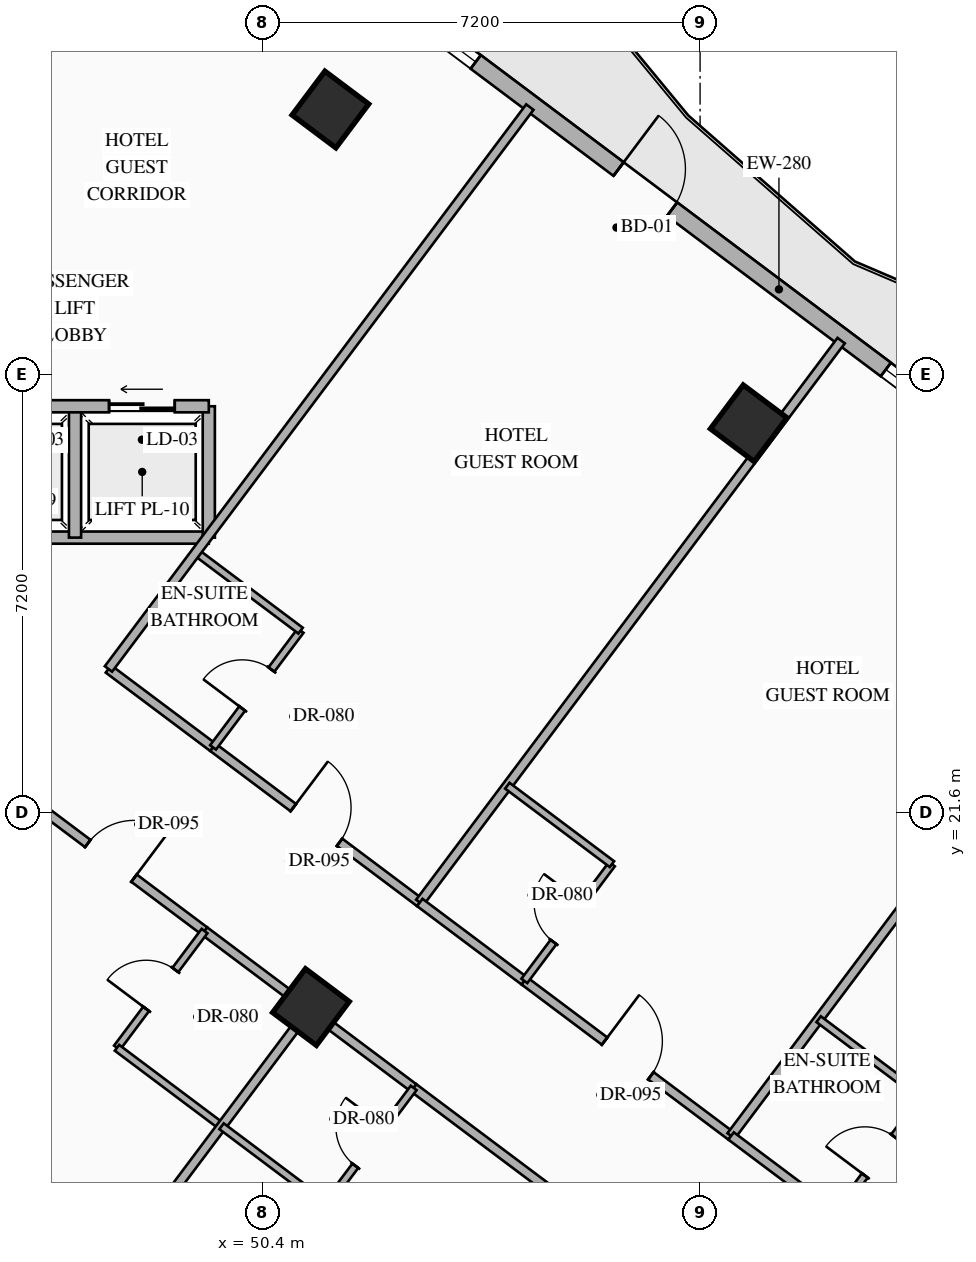
"""IFC4 building model, lengths in metres.
Left out: names, types, materials, properties, quantities, classifications, styles, units other than length and angle.
Written with IfcOpenShell. Run it as: python <this file> out.ifc"""

import sys

from ifc_helpers import new_model, si_unit, direction, frame, frame_2d, origin, origin_2d, place, context, subcontext, project, spatial, rectangle, hollow_rectangle, extrude, element, fill, save


model = new_model("IFC4")
c1 = context("Model", 3, precision=1e-05, world=origin(), true_north=direction((0.0, 1.0)))
c2 = subcontext(c1, "Body", "Model", "MODEL_VIEW")
j1 = project(units=[si_unit("LENGTHUNIT", "METRE"), si_unit("PLANEANGLEUNIT", "RADIAN")], contexts=[c1])
p1 = place(None, origin())
s1 = spatial("IfcSite", under=j1, at=p1, CompositionType="ELEMENT")
p2 = place(p1, origin())
s2 = spatial("IfcBuilding", under=s1, at=p2, CompositionType="ELEMENT")
p3 = place(p2, frame((0.0, 0.0, 70.1)))
s3 = spatial("IfcBuildingStorey", under=s2, at=p3, CompositionType="ELEMENT", Elevation=70.1)
for number, where, z_axis, x_axis in (
    (1, (51.52, 33.16, 0.0), (0.0, 0.0, 1.0), (0.8, -0.6, 0.0)),
    (2, (58.4, 28.0, 0.0), (0.0, 0.0, 1.0), (0.8, -0.6, 0.0)),
    (3, (51.2, 18.4, 0.0), (0.0, 0.0, 1.0), (0.8, -0.6, 0.0)),
):
    element("IfcColumn", number, at=place(p3, frame(where, z_axis=z_axis, x_axis=x_axis)), inside=s3, PredefinedType="COLUMN", context=c2, shape_type="SweptSolid", body=[
        extrude(hollow_rectangle(XDim=0.9, YDim=0.9, WallThickness=0.036, at=origin_2d()), origin(), (0.0, 0.0, 1.0), 4.5),
    ])
p4 = place(p3, frame((44.86, 40.73, 0.0), z_axis=(0.0, 0.0, 1.0), x_axis=(0.800006902154, -0.599990797017, 0.0)))
e4 = element("IfcWall", 4, at=p4, inside=s3, PredefinedType="STANDARD", context=c2, shape_type="SweptSolid", body=[
    extrude(rectangle(XDim=29.712, YDim=0.28, at=frame_2d((14.856, 0.0))), origin(), (0.0, 0.0, 1.0), 4.28),
])
p5 = place(p4, frame((14.249, 0.0, 0.0)))
e5 = element("IfcOpeningElement", 5, at=p5, cuts=e4, PredefinedType="OPENING", context=c2, shape_type="SweptSolid", body=[
    extrude(rectangle(XDim=1.1, YDim=2.2, at=frame_2d((0.55, 1.1))), frame((0.0, 0.15, 0.0), z_axis=(0.0, -1.0, 0.0), x_axis=(1.0, 0.0, 0.0)), (0.0, 0.0, 1.0), 0.3),
])
p6 = place(p4, frame((1.612, 0.0, 0.85)))
e6 = element("IfcOpeningElement", 6, at=p6, cuts=e4, PredefinedType="OPENING", context=c2, shape_type="SweptSolid", body=[
    extrude(rectangle(XDim=1.4, YDim=1.8, at=frame_2d((0.7, 0.9))), frame((0.0, 0.15, 0.0), z_axis=(0.0, -1.0, 0.0), x_axis=(1.0, 0.0, 0.0)), (0.0, 0.0, 1.0), 0.3),
])
p7 = place(p4, frame((5.667, 0.0, 0.85)))
e7 = element("IfcOpeningElement", 7, at=p7, cuts=e4, PredefinedType="OPENING", context=c2, shape_type="SweptSolid", body=[
    extrude(rectangle(XDim=1.4, YDim=1.8, at=frame_2d((0.7, 0.9))), frame((0.0, 0.15, 0.0), z_axis=(0.0, -1.0, 0.0), x_axis=(1.0, 0.0, 0.0)), (0.0, 0.0, 1.0), 0.3),
])
p8 = place(p4, frame((9.912, 0.0, 0.85)))
e8 = element("IfcOpeningElement", 8, at=p8, cuts=e4, PredefinedType="OPENING", context=c2, shape_type="SweptSolid", body=[
    extrude(rectangle(XDim=1.4, YDim=1.8, at=frame_2d((0.7, 0.9))), frame((0.0, 0.15, 0.0), z_axis=(0.0, -1.0, 0.0), x_axis=(1.0, 0.0, 0.0)), (0.0, 0.0, 1.0), 0.3),
])
p9 = place(p4, frame((19.743, 0.0, 0.85)))
e9 = element("IfcOpeningElement", 9, at=p9, cuts=e4, PredefinedType="OPENING", context=c2, shape_type="SweptSolid", body=[
    extrude(rectangle(XDim=1.4, YDim=1.8, at=frame_2d((0.7, 0.9))), frame((0.0, 0.15, 0.0), z_axis=(0.0, -1.0, 0.0), x_axis=(1.0, 0.0, 0.0)), (0.0, 0.0, 1.0), 0.3),
])
p10 = place(p4, frame((22.645, 0.0, 0.85)))
e10 = element("IfcOpeningElement", 10, at=p10, cuts=e4, PredefinedType="OPENING", context=c2, shape_type="SweptSolid", body=[
    extrude(rectangle(XDim=1.4, YDim=1.8, at=frame_2d((0.7, 0.9))), frame((0.0, 0.15, 0.0), z_axis=(0.0, -1.0, 0.0), x_axis=(1.0, 0.0, 0.0)), (0.0, 0.0, 1.0), 0.3),
])
p11 = place(p4, frame((26.354, 0.0, 0.85)))
e11 = element("IfcOpeningElement", 11, at=p11, cuts=e4, PredefinedType="OPENING", context=c2, shape_type="SweptSolid", body=[
    extrude(rectangle(XDim=1.4, YDim=1.8, at=frame_2d((0.7, 0.9))), frame((0.0, 0.15, 0.0), z_axis=(0.0, -1.0, 0.0), x_axis=(1.0, 0.0, 0.0)), (0.0, 0.0, 1.0), 0.3),
])
p12 = place(p3, frame((45.12, 26.12, 0.0), z_axis=(0.0, 0.0, 1.0), x_axis=(1.0, 0.0, 0.0)))
e12 = element("IfcWall", 12, at=p12, inside=s3, PredefinedType="STANDARD", context=c2, shape_type="SweptSolid", body=[
    extrude(rectangle(XDim=4.4, YDim=0.2, at=frame_2d((2.2, 0.0))), origin(), (0.0, 0.0, 1.0), 4.28),
])
for number, where, z_axis, x_axis in (
    (13, (49.52, 26.12, 0.0), (0.0, 0.0, 1.0), (0.0, 1.0, 0.0)),
    (14, (47.32, 26.12, 0.0), (0.0, 0.0, 1.0), (0.0, 1.0, 0.0)),
):
    element("IfcWall", number, at=place(p3, frame(where, z_axis=z_axis, x_axis=x_axis)), inside=s3, PredefinedType="STANDARD", context=c2, shape_type="SweptSolid", body=[
        extrude(rectangle(XDim=2.16, YDim=0.2, at=frame_2d((1.08, 0.0))), origin(), (0.0, 0.0, 1.0), 4.28),
    ])
p13 = place(p3, frame((45.12, 28.28, 0.0), z_axis=(0.0, 0.0, 1.0), x_axis=(1.0, 0.0, 0.0)))
e15 = element("IfcWall", 15, at=p13, inside=s3, PredefinedType="STANDARD", context=c2, shape_type="SweptSolid", body=[
    extrude(rectangle(XDim=4.4, YDim=0.2, at=frame_2d((2.2, 0.0))), origin(), (0.0, 0.0, 1.0), 4.28),
])
p14 = place(p13, frame((0.56, 0.0, 0.0)))
e16 = element("IfcOpeningElement", 16, at=p14, cuts=e15, PredefinedType="OPENING", context=c2, shape_type="SweptSolid", body=[
    extrude(rectangle(XDim=1.08, YDim=2.15, at=frame_2d((0.54, 1.075))), frame((0.0, 0.11, 0.0), z_axis=(0.0, -1.0, 0.0), x_axis=(1.0, 0.0, 0.0)), (0.0, 0.0, 1.0), 0.22),
])
p15 = place(p13, frame((2.76, 0.0, 0.0)))
e17 = element("IfcOpeningElement", 17, at=p15, cuts=e15, PredefinedType="OPENING", context=c2, shape_type="SweptSolid", body=[
    extrude(rectangle(XDim=1.08, YDim=2.15, at=frame_2d((0.54, 1.075))), frame((0.0, 0.11, 0.0), z_axis=(0.0, -1.0, 0.0), x_axis=(1.0, 0.0, 0.0)), (0.0, 0.0, 1.0), 0.22),
])
p16 = place(p3, frame((47.87, 23.96, 0.0), z_axis=(0.0, 0.0, 1.0), x_axis=(0.79998637334, -0.60001816845, 0.0)))
e18 = element("IfcWall", 18, at=p16, inside=s3, PredefinedType="PARTITIONING", context=c2, shape_type="SweptSolid", body=[
    extrude(rectangle(XDim=2.15, YDim=0.15, at=frame_2d((1.075, 0.0))), origin(), (0.0, 0.0, 1.0), 3.925),
])
p17 = place(p3, frame((49.59, 22.67, 0.0), z_axis=(0.0, 0.0, 1.0), x_axis=(0.800013787187, -0.599981616644, 0.0)))
e19 = element("IfcWall", 19, at=p17, inside=s3, PredefinedType="PARTITIONING", context=c2, shape_type="SweptSolid", body=[
    extrude(rectangle(XDim=4.25, YDim=0.15, at=frame_2d((2.125, 0.0))), origin(), (0.0, 0.0, 1.0), 3.925),
])
p18 = place(p17, frame((1.65, 0.0, 0.0)))
e20 = element("IfcOpeningElement", 20, at=p18, cuts=e19, PredefinedType="OPENING", context=c2, shape_type="SweptSolid", body=[
    extrude(rectangle(XDim=0.95, YDim=2.15, at=frame_2d((0.475, 1.075))), frame((0.0, 0.085, 0.0), z_axis=(0.0, -1.0, 0.0), x_axis=(1.0, 0.0, 0.0)), (0.0, 0.0, 1.0), 0.17),
])
p19 = place(p3, frame((49.59, 22.67, 0.0), z_axis=(0.0, 0.0, 1.0), x_axis=(0.599951172744, 0.800036618114, 0.0)))
e21 = element("IfcWall", 21, at=p19, inside=s3, PredefinedType="PARTITIONING", context=c2, shape_type="SweptSolid", body=[
    extrude(rectangle(XDim=2.4, YDim=0.12, at=frame_2d((1.2, 0.0))), origin(), (0.0, 0.0, 1.0), 4.28),
])
p20 = place(p19, frame((0.8, 0.0, 0.0)))
e22 = element("IfcOpeningElement", 22, at=p20, cuts=e21, PredefinedType="OPENING", context=c2, shape_type="SweptSolid", body=[
    extrude(rectangle(XDim=0.8, YDim=2.06, at=frame_2d((0.4, 1.03))), frame((0.0, 0.07, 0.0), z_axis=(0.0, -1.0, 0.0), x_axis=(1.0, 0.0, 0.0)), (0.0, 0.0, 1.0), 0.14),
])
p21 = place(p3, frame((49.31, 25.88, 0.0), z_axis=(0.0, 0.0, 1.0), x_axis=(0.800040880289, -0.59994548908, 0.0)))
e23 = element("IfcWall", 23, at=p21, inside=s3, PredefinedType="PARTITIONING", context=c2, shape_type="SweptSolid", body=[
    extrude(rectangle(XDim=2.15, YDim=0.12, at=frame_2d((1.075, 0.0))), origin(), (0.0, 0.0, 1.0), 4.28),
])
for number, where, z_axis, x_axis in (
    (24, (47.87, 23.96, 0.0), (0.0, 0.0, 1.0), (0.6, 0.8, 0.0)),
    (25, (52.99, 20.12, 0.0), (0.0, 0.0, 1.0), (0.6, 0.8, 0.0)),
):
    element("IfcWall", number, at=place(p3, frame(where, z_axis=z_axis, x_axis=x_axis)), inside=s3, PredefinedType="PARTITIONING", context=c2, shape_type="SweptSolid", body=[
        extrude(rectangle(XDim=11.55, YDim=0.15, at=frame_2d((5.775, 0.0))), origin(), (0.0, 0.0, 1.0), 4.28),
    ])
p22 = place(p3, frame((52.99, 20.12, 0.0), z_axis=(0.0, 0.0, 1.0), x_axis=(0.79998637334, -0.60001816845, 0.0)))
e26 = element("IfcWall", 26, at=p22, inside=s3, PredefinedType="PARTITIONING", context=c2, shape_type="SweptSolid", body=[
    extrude(rectangle(XDim=2.15, YDim=0.15, at=frame_2d((1.075, 0.0))), origin(), (0.0, 0.0, 1.0), 3.925),
])
p23 = place(p3, frame((54.71, 18.83, 0.0), z_axis=(0.0, 0.0, 1.0), x_axis=(0.800006893092, -0.599990809101, 0.0)))
e27 = element("IfcWall", 27, at=p23, inside=s3, PredefinedType="PARTITIONING", context=c2, shape_type="SweptSolid", body=[
    extrude(rectangle(XDim=4.25, YDim=0.15, at=frame_2d((2.125, 0.0))), origin(), (0.0, 0.0, 1.0), 3.925),
])
p24 = place(p23, frame((1.65, 0.0, 0.0)))
e28 = element("IfcOpeningElement", 28, at=p24, cuts=e27, PredefinedType="OPENING", context=c2, shape_type="SweptSolid", body=[
    extrude(rectangle(XDim=0.95, YDim=2.15, at=frame_2d((0.475, 1.075))), frame((0.0, 0.085, 0.0), z_axis=(0.0, -1.0, 0.0), x_axis=(1.0, 0.0, 0.0)), (0.0, 0.0, 1.0), 0.17),
])
p25 = place(p3, frame((54.71, 18.83, 0.0), z_axis=(0.0, 0.0, 1.0), x_axis=(0.6, 0.8, 0.0)))
e29 = element("IfcWall", 29, at=p25, inside=s3, PredefinedType="PARTITIONING", context=c2, shape_type="SweptSolid", body=[
    extrude(rectangle(XDim=2.4, YDim=0.12, at=frame_2d((1.2, 0.0))), origin(), (0.0, 0.0, 1.0), 4.28),
])
p26 = place(p25, frame((0.8, 0.0, 0.0)))
e30 = element("IfcOpeningElement", 30, at=p26, cuts=e29, PredefinedType="OPENING", context=c2, shape_type="SweptSolid", body=[
    extrude(rectangle(XDim=0.8, YDim=2.06, at=frame_2d((0.4, 1.03))), frame((0.0, 0.07, 0.0), z_axis=(0.0, -1.0, 0.0), x_axis=(1.0, 0.0, 0.0)), (0.0, 0.0, 1.0), 0.14),
])
p27 = place(p3, frame((54.43, 22.04, 0.0), z_axis=(0.0, 0.0, 1.0), x_axis=(0.79998637334, -0.60001816845, 0.0)))
e31 = element("IfcWall", 31, at=p27, inside=s3, PredefinedType="PARTITIONING", context=c2, shape_type="SweptSolid", body=[
    extrude(rectangle(XDim=2.15, YDim=0.12, at=frame_2d((1.075, 0.0))), origin(), (0.0, 0.0, 1.0), 4.28),
])
p28 = place(p3, frame((58.11, 16.28, 0.0), z_axis=(0.0, 0.0, 1.0), x_axis=(0.599996617946, 0.80000253653, 0.0)))
e32 = element("IfcWall", 32, at=p28, inside=s3, PredefinedType="PARTITIONING", context=c2, shape_type="SweptSolid", body=[
    extrude(rectangle(XDim=11.55, YDim=0.15, at=frame_2d((5.775, 0.0))), origin(), (0.0, 0.0, 1.0), 4.28),
])
p29 = place(p3, frame((58.11, 16.28, 0.0), z_axis=(0.0, 0.0, 1.0), x_axis=(0.79998637334, -0.60001816845, 0.0)))
e33 = element("IfcWall", 33, at=p29, inside=s3, PredefinedType="PARTITIONING", context=c2, shape_type="SweptSolid", body=[
    extrude(rectangle(XDim=2.15, YDim=0.15, at=frame_2d((1.075, 0.0))), origin(), (0.0, 0.0, 1.0), 3.925),
])
p30 = place(p3, frame((59.83, 14.99, 0.0), z_axis=(0.0, 0.0, 1.0), x_axis=(0.6, 0.8, 0.0)))
e34 = element("IfcWall", 34, at=p30, inside=s3, PredefinedType="PARTITIONING", context=c2, shape_type="SweptSolid", body=[
    extrude(rectangle(XDim=2.4, YDim=0.12, at=frame_2d((1.2, 0.0))), origin(), (0.0, 0.0, 1.0), 4.28),
])
p31 = place(p30, frame((0.8, 0.0, 0.0)))
e35 = element("IfcOpeningElement", 35, at=p31, cuts=e34, PredefinedType="OPENING", context=c2, shape_type="SweptSolid", body=[
    extrude(rectangle(XDim=0.8, YDim=2.06, at=frame_2d((0.4, 1.03))), frame((0.0, 0.07, 0.0), z_axis=(0.0, -1.0, 0.0), x_axis=(1.0, 0.0, 0.0)), (0.0, 0.0, 1.0), 0.14),
])
p32 = place(p3, frame((59.55, 18.2, 0.0), z_axis=(0.0, 0.0, 1.0), x_axis=(0.79998637334, -0.60001816845, 0.0)))
e36 = element("IfcWall", 36, at=p32, inside=s3, PredefinedType="PARTITIONING", context=c2, shape_type="SweptSolid", body=[
    extrude(rectangle(XDim=2.15, YDim=0.12, at=frame_2d((1.075, 0.0))), origin(), (0.0, 0.0, 1.0), 4.28),
])
p33 = place(p3, frame((46.37, 21.96, 0.0), z_axis=(0.0, 0.0, 1.0), x_axis=(0.799977170108, -0.600030438649, 0.0)))
e37 = element("IfcWall", 37, at=p33, inside=s3, PredefinedType="PARTITIONING", context=c2, shape_type="SweptSolid", body=[
    extrude(rectangle(XDim=3.85, YDim=0.15, at=frame_2d((1.925, 0.0))), origin(), (0.0, 0.0, 1.0), 3.475),
])
p34 = place(p33, frame((1.45, 0.0, 0.0)))
e38 = element("IfcOpeningElement", 38, at=p34, cuts=e37, PredefinedType="OPENING", context=c2, shape_type="SweptSolid", body=[
    extrude(rectangle(XDim=0.95, YDim=2.15, at=frame_2d((0.475, 1.075))), frame((0.0, 0.085, 0.0), z_axis=(0.0, -1.0, 0.0), x_axis=(1.0, 0.0, 0.0)), (0.0, 0.0, 1.0), 0.17),
])
p35 = place(p3, frame((49.45, 19.65, 0.0), z_axis=(0.0, 0.0, 1.0), x_axis=(0.800040880289, -0.59994548908, 0.0)))
e39 = element("IfcWall", 39, at=p35, inside=s3, PredefinedType="PARTITIONING", context=c2, shape_type="SweptSolid", body=[
    extrude(rectangle(XDim=2.15, YDim=0.15, at=frame_2d((1.075, 0.0))), origin(), (0.0, 0.0, 1.0), 3.475),
])
p36 = place(p3, frame((48.01, 17.73, 0.0), z_axis=(0.0, 0.0, 1.0), x_axis=(0.6, 0.8, 0.0)))
e40 = element("IfcWall", 40, at=p36, inside=s3, PredefinedType="PARTITIONING", context=c2, shape_type="SweptSolid", body=[
    extrude(rectangle(XDim=2.4, YDim=0.12, at=frame_2d((1.2, 0.0))), origin(), (0.0, 0.0, 1.0), 4.28),
])
p37 = place(p36, frame((0.8, 0.0, 0.0)))
e41 = element("IfcOpeningElement", 41, at=p37, cuts=e40, PredefinedType="OPENING", context=c2, shape_type="SweptSolid", body=[
    extrude(rectangle(XDim=0.8, YDim=2.06, at=frame_2d((0.4, 1.03))), frame((0.0, 0.07, 0.0), z_axis=(0.0, -1.0, 0.0), x_axis=(1.0, 0.0, 0.0)), (0.0, 0.0, 1.0), 0.14),
])
p38 = place(p3, frame((48.01, 17.73, 0.0), z_axis=(0.0, 0.0, 1.0), x_axis=(0.79998637334, -0.60001816845, 0.0)))
e42 = element("IfcWall", 42, at=p38, inside=s3, PredefinedType="PARTITIONING", context=c2, shape_type="SweptSolid", body=[
    extrude(rectangle(XDim=2.15, YDim=0.12, at=frame_2d((1.075, 0.0))), origin(), (0.0, 0.0, 1.0), 4.28),
])
p39 = place(p3, frame((44.36, 9.28, 0.0), z_axis=(0.0, 0.0, 1.0), x_axis=(0.599986233332, 0.800010324816, 0.0)))
e43 = element("IfcWall", 43, at=p39, inside=s3, PredefinedType="PARTITIONING", context=c2, shape_type="SweptSolid", body=[
    extrude(rectangle(XDim=11.35, YDim=0.15, at=frame_2d((5.675, 0.0))), origin(), (0.0, 0.0, 1.0), 3.475),
])
p40 = place(p3, frame((51.17, 18.36, 0.0), z_axis=(0.0, 0.0, 1.0), x_axis=(0.79998637334, -0.60001816845, 0.0)))
e44 = element("IfcWall", 44, at=p40, inside=s3, PredefinedType="PARTITIONING", context=c2, shape_type="SweptSolid", body=[
    extrude(rectangle(XDim=2.15, YDim=0.15, at=frame_2d((1.075, 0.0))), origin(), (0.0, 0.0, 1.0), 3.475),
])
p41 = place(p3, frame((52.89, 17.07, 0.0), z_axis=(0.0, 0.0, 1.0), x_axis=(0.8, -0.6, 0.0)))
e45 = element("IfcWall", 45, at=p41, inside=s3, PredefinedType="PARTITIONING", context=c2, shape_type="SweptSolid", body=[
    extrude(rectangle(XDim=11.51, YDim=0.15, at=frame_2d((5.755, 0.0))), origin(), (0.0, 0.0, 1.0), 3.475),
])
p42 = place(p41, frame((5.28, 0.0, 0.0)))
e46 = element("IfcOpeningElement", 46, at=p42, cuts=e45, PredefinedType="OPENING", context=c2, shape_type="SweptSolid", body=[
    extrude(rectangle(XDim=0.95, YDim=2.15, at=frame_2d((0.475, 1.075))), frame((0.0, 0.085, 0.0), z_axis=(0.0, -1.0, 0.0), x_axis=(1.0, 0.0, 0.0)), (0.0, 0.0, 1.0), 0.17),
])
p43 = place(p3, frame((51.45, 15.15, 0.0), z_axis=(0.0, 0.0, 1.0), x_axis=(0.599951172744, 0.800036618114, 0.0)))
e47 = element("IfcWall", 47, at=p43, inside=s3, PredefinedType="PARTITIONING", context=c2, shape_type="SweptSolid", body=[
    extrude(rectangle(XDim=2.4, YDim=0.12, at=frame_2d((1.2, 0.0))), origin(), (0.0, 0.0, 1.0), 4.28),
])
p44 = place(p43, frame((0.8, 0.0, 0.0)))
e48 = element("IfcOpeningElement", 48, at=p44, cuts=e47, PredefinedType="OPENING", context=c2, shape_type="SweptSolid", body=[
    extrude(rectangle(XDim=0.8, YDim=2.06, at=frame_2d((0.4, 1.03))), frame((0.0, 0.07, 0.0), z_axis=(0.0, -1.0, 0.0), x_axis=(1.0, 0.0, 0.0)), (0.0, 0.0, 1.0), 0.14),
])
p45 = place(p3, frame((49.73, 16.44, 0.0), z_axis=(0.0, 0.0, 1.0), x_axis=(0.79998637334, -0.60001816845, 0.0)))
e49 = element("IfcWall", 49, at=p45, inside=s3, PredefinedType="PARTITIONING", context=c2, shape_type="SweptSolid", body=[
    extrude(rectangle(XDim=2.15, YDim=0.12, at=frame_2d((1.075, 0.0))), origin(), (0.0, 0.0, 1.0), 4.28),
])
p46 = place(p5, origin())
e50 = element("IfcDoor", 50, at=p46, inside=s3, OperationType="SINGLE_SWING_LEFT", PredefinedType="DOOR", context=c2, shape_type="SweptSolid", body=[
    extrude(rectangle(XDim=1.1, YDim=2.2, at=frame_2d((0.55, 1.1))), frame((0.0, 0.025, 0.0), z_axis=(0.0, -1.0, 0.0), x_axis=(1.0, 0.0, 0.0)), (0.0, 0.0, 1.0), 0.05),
])
fill(e5, e50)
p47 = place(p8, origin())
e51 = element("IfcWindow", 51, at=p47, inside=s3, PartitioningType="SINGLE_PANEL", PredefinedType="WINDOW", context=c2, shape_type="SweptSolid", body=[
    extrude(rectangle(XDim=1.4, YDim=1.8, at=frame_2d((0.7, 0.9))), frame((0.0, 0.03, 0.0), z_axis=(0.0, -1.0, 0.0), x_axis=(1.0, 0.0, 0.0)), (0.0, 0.0, 1.0), 0.06),
])
fill(e8, e51)
p48 = place(p9, origin())
e52 = element("IfcWindow", 52, at=p48, inside=s3, PartitioningType="SINGLE_PANEL", PredefinedType="WINDOW", context=c2, shape_type="SweptSolid", body=[
    extrude(rectangle(XDim=1.4, YDim=1.8, at=frame_2d((0.7, 0.9))), frame((0.0, 0.03, 0.0), z_axis=(0.0, -1.0, 0.0), x_axis=(1.0, 0.0, 0.0)), (0.0, 0.0, 1.0), 0.06),
])
fill(e9, e52)
p49 = place(p15, origin())
e53 = element("IfcDoor", 53, at=p49, inside=s3, OperationType="SLIDING_TO_LEFT", PredefinedType="USERDEFINED", context=c2, shape_type="SweptSolid", body=[
    extrude(rectangle(XDim=1.08, YDim=2.15, at=frame_2d((0.54, 1.075))), frame((0.0, 0.025, 0.0), z_axis=(0.0, -1.0, 0.0), x_axis=(1.0, 0.0, 0.0)), (0.0, 0.0, 1.0), 0.05),
])
fill(e17, e53)
p50 = place(p18, origin())
e54 = element("IfcDoor", 54, at=p50, inside=s3, OperationType="SINGLE_SWING_LEFT", PredefinedType="DOOR", context=c2, shape_type="SweptSolid", body=[
    extrude(rectangle(XDim=0.95, YDim=2.15, at=frame_2d((0.475, 1.075))), frame((0.0, 0.025, 0.0), z_axis=(0.0, -1.0, 0.0), x_axis=(1.0, 0.0, 0.0)), (0.0, 0.0, 1.0), 0.05),
])
fill(e20, e54)
p51 = place(p20, origin())
e55 = element("IfcDoor", 55, at=p51, inside=s3, OperationType="SINGLE_SWING_LEFT", PredefinedType="DOOR", context=c2, shape_type="SweptSolid", body=[
    extrude(rectangle(XDim=0.8, YDim=2.06, at=frame_2d((0.4, 1.03))), frame((0.0, 0.025, 0.0), z_axis=(0.0, -1.0, 0.0), x_axis=(1.0, 0.0, 0.0)), (0.0, 0.0, 1.0), 0.05),
])
fill(e22, e55)
p52 = place(p24, origin())
e56 = element("IfcDoor", 56, at=p52, inside=s3, OperationType="SINGLE_SWING_LEFT", PredefinedType="DOOR", context=c2, shape_type="SweptSolid", body=[
    extrude(rectangle(XDim=0.95, YDim=2.15, at=frame_2d((0.475, 1.075))), frame((0.0, 0.025, 0.0), z_axis=(0.0, -1.0, 0.0), x_axis=(1.0, 0.0, 0.0)), (0.0, 0.0, 1.0), 0.05),
])
fill(e28, e56)
p53 = place(p26, origin())
e57 = element("IfcDoor", 57, at=p53, inside=s3, OperationType="SINGLE_SWING_RIGHT", PredefinedType="DOOR", context=c2, shape_type="SweptSolid", body=[
    extrude(rectangle(XDim=0.8, YDim=2.06, at=frame_2d((0.4, 1.03))), frame((0.0, 0.025, 0.0), z_axis=(0.0, -1.0, 0.0), x_axis=(1.0, 0.0, 0.0)), (0.0, 0.0, 1.0), 0.05),
])
fill(e30, e57)
p54 = place(p31, origin())
e58 = element("IfcDoor", 58, at=p54, inside=s3, OperationType="SINGLE_SWING_LEFT", PredefinedType="DOOR", context=c2, shape_type="SweptSolid", body=[
    extrude(rectangle(XDim=0.8, YDim=2.06, at=frame_2d((0.4, 1.03))), frame((0.0, 0.025, 0.0), z_axis=(0.0, -1.0, 0.0), x_axis=(1.0, 0.0, 0.0)), (0.0, 0.0, 1.0), 0.05),
])
fill(e35, e58)
p55 = place(p34, origin())
e59 = element("IfcDoor", 59, at=p55, inside=s3, OperationType="SINGLE_SWING_RIGHT", PredefinedType="DOOR", context=c2, shape_type="SweptSolid", body=[
    extrude(rectangle(XDim=0.95, YDim=2.15, at=frame_2d((0.475, 1.075))), frame((0.0, 0.025, 0.0), z_axis=(0.0, -1.0, 0.0), x_axis=(1.0, 0.0, 0.0)), (0.0, 0.0, 1.0), 0.05),
])
fill(e38, e59)
p56 = place(p37, origin())
e60 = element("IfcDoor", 60, at=p56, inside=s3, OperationType="SINGLE_SWING_LEFT", PredefinedType="DOOR", context=c2, shape_type="SweptSolid", body=[
    extrude(rectangle(XDim=0.8, YDim=2.06, at=frame_2d((0.4, 1.03))), frame((0.0, 0.025, 0.0), z_axis=(0.0, -1.0, 0.0), x_axis=(1.0, 0.0, 0.0)), (0.0, 0.0, 1.0), 0.05),
])
fill(e41, e60)
p57 = place(p44, origin())
e61 = element("IfcDoor", 61, at=p57, inside=s3, OperationType="SINGLE_SWING_RIGHT", PredefinedType="DOOR", context=c2, shape_type="SweptSolid", body=[
    extrude(rectangle(XDim=0.8, YDim=2.06, at=frame_2d((0.4, 1.03))), frame((0.0, 0.025, 0.0), z_axis=(0.0, -1.0, 0.0), x_axis=(1.0, 0.0, 0.0)), (0.0, 0.0, 1.0), 0.05),
])
fill(e48, e61)
save(model, sys.argv[1])
